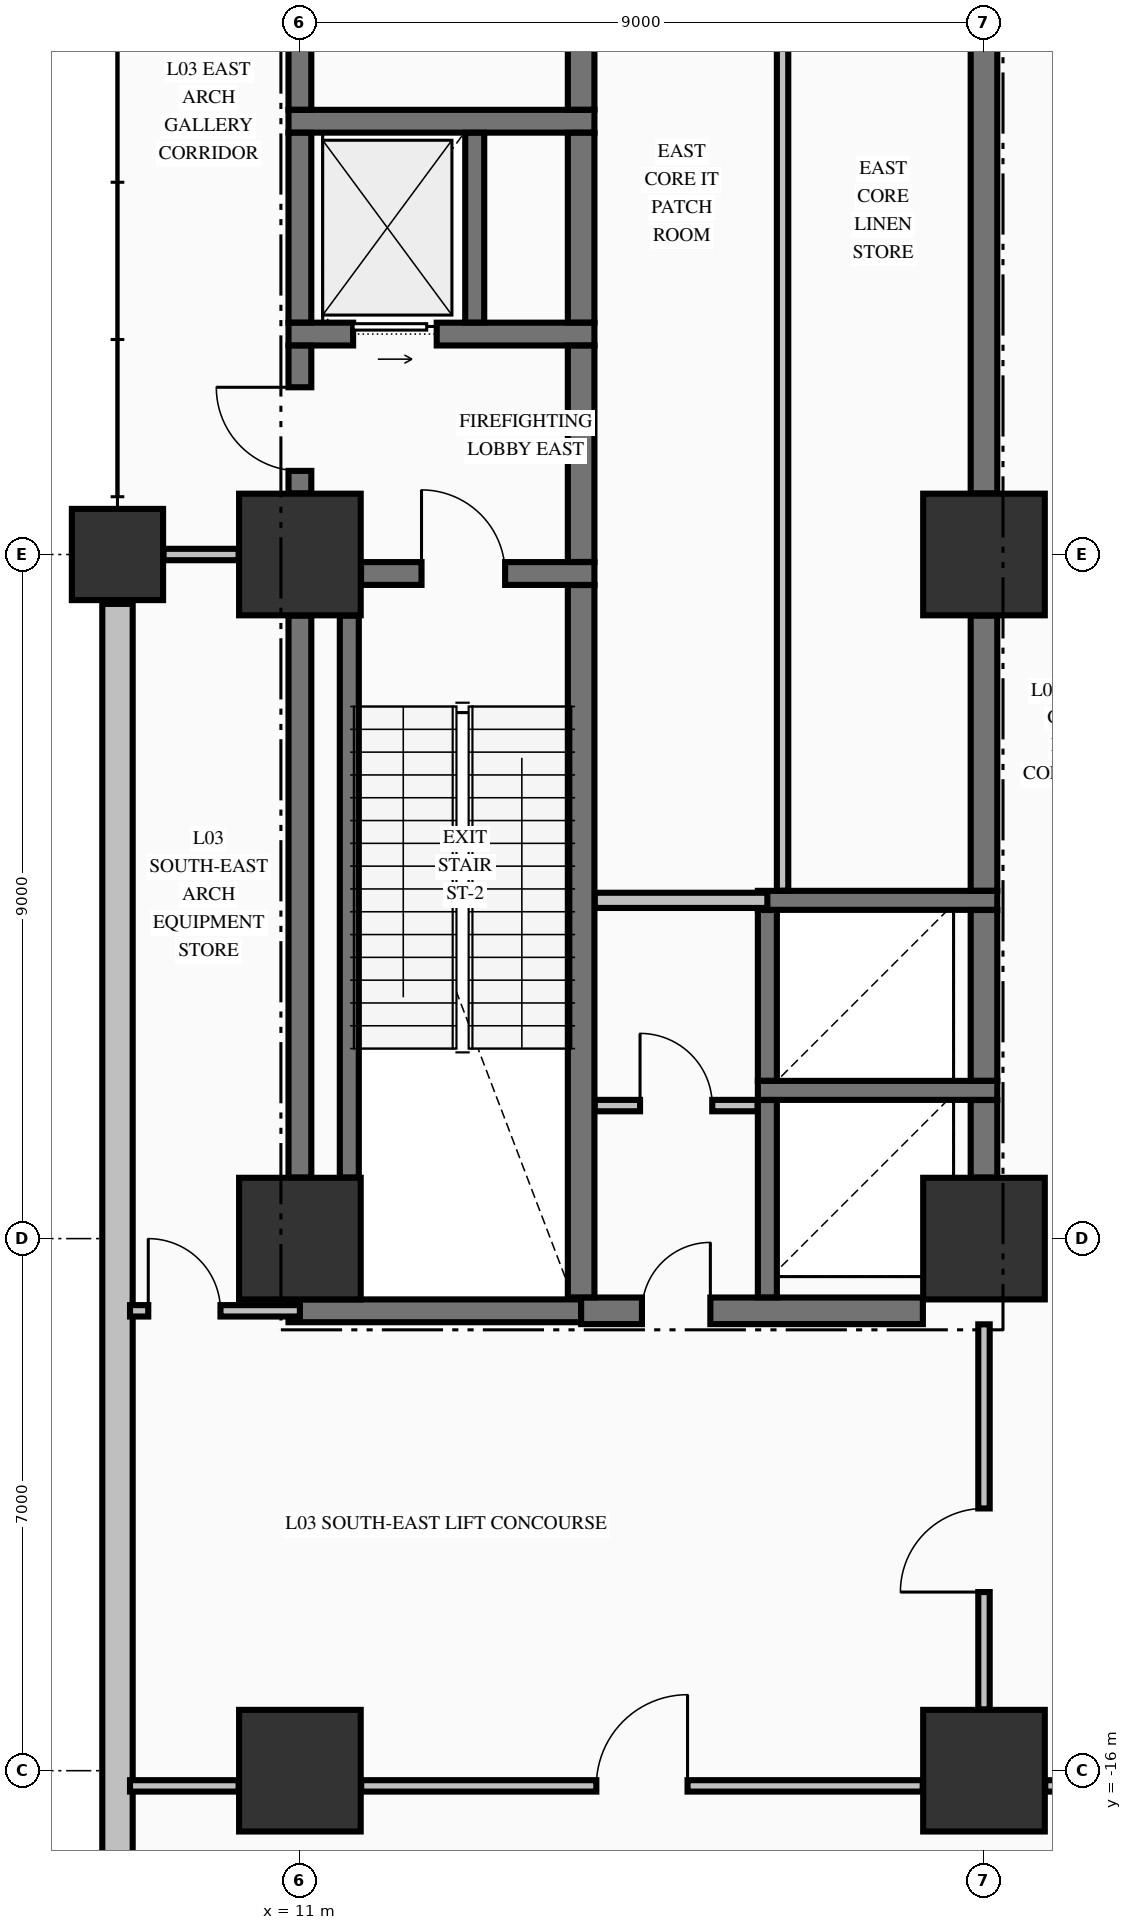
"""IFC4 building model, lengths in metres.
Left out: names, types, materials, properties, quantities, classifications, styles, units other than length and angle.
Written with IfcOpenShell. Run it as: python <this file> out.ifc"""

import sys

from ifc_helpers import new_model, si_unit, direction, frame, frame_2d, origin, origin_2d, place, context, subcontext, project, spatial, rectangle, extrude, element, fill, save


model = new_model("IFC4")
c1 = context("Model", 3, precision=1e-05, world=origin(), true_north=direction((0.0, 1.0)))
c2 = subcontext(c1, "Body", "Model", "MODEL_VIEW")
j1 = project(units=[si_unit("LENGTHUNIT", "METRE"), si_unit("PLANEANGLEUNIT", "RADIAN")], contexts=[c1])
p1 = place(None, origin())
s1 = spatial("IfcSite", under=j1, at=p1, CompositionType="ELEMENT")
p2 = place(p1, origin())
s2 = spatial("IfcBuilding", under=s1, at=p2, CompositionType="ELEMENT")
p3 = place(p2, frame((0.0, 0.0, 16.32)))
s3 = spatial("IfcBuildingStorey", under=s2, at=p3, CompositionType="ELEMENT", Elevation=16.32)
for number, where, z_axis, x_axis in (
    (1, (11.0, -16.0, 0.0), (0.0, 0.0, 1.0), (1.0, 0.0, 0.0)),
    (2, (11.0, -9.0, 0.0), (0.0, 0.0, 1.0), (1.0, 0.0, 0.0)),
    (3, (11.0, 0.0, 0.0), (0.0, 0.0, 1.0), (1.0, 0.0, 0.0)),
    (4, (20.0, -16.0, 0.0), (0.0, 0.0, 1.0), (1.0, 0.0, 0.0)),
    (5, (20.0, -9.0, 0.0), (0.0, 0.0, 1.0), (1.0, 0.0, 0.0)),
    (6, (20.0, 0.0, 0.0), (0.0, 0.0, 1.0), (1.0, 0.0, 0.0)),
):
    element("IfcColumn", number, at=place(p3, frame(where, z_axis=z_axis, x_axis=x_axis)), inside=s3, PredefinedType="COLUMN", context=c2, shape_type="SweptSolid", body=[
        extrude(rectangle(XDim=1.6, YDim=1.6, at=origin_2d()), origin(), (0.0, 0.0, 1.0), 4.99),
    ])
p4 = place(p3, frame((8.6, 0.0, 0.0), z_axis=(0.0, 0.0, 1.0), x_axis=(1.0, 0.0, 0.0)))
e7 = element("IfcColumn", 7, at=p4, inside=s3, PredefinedType="COLUMN", context=c2, shape_type="SweptSolid", body=[
    extrude(rectangle(XDim=1.2, YDim=1.2, at=origin_2d()), origin(), (0.0, 0.0, 1.0), 4.99),
])
p5 = place(p3, frame((8.6, -0.65, 0.0), z_axis=(0.0, 0.0, 1.0), x_axis=(0.0, -1.0, 0.0)))
e8 = element("IfcWall", 8, at=p5, inside=s3, PredefinedType="STANDARD", context=c2, shape_type="SweptSolid", body=[
    extrude(rectangle(XDim=24.72, YDim=0.4, at=frame_2d((12.36, 0.0))), origin(), (0.0, 0.0, 1.0), 2.582),
])
p6 = place(p3, frame((10.85, -9.95, 0.0), z_axis=(0.0, 0.0, 1.0), x_axis=(1.0, 0.0, 0.0)))
e9 = element("IfcWall", 9, at=p6, inside=s3, PredefinedType="SHEAR", context=c2, shape_type="SweptSolid", body=[
    extrude(rectangle(XDim=3.85, YDim=0.3, at=frame_2d((1.925, 0.0))), origin(), (0.0, 0.0, 1.0), 4.99),
])
p7 = place(p3, frame((14.7, -9.95, 0.0), z_axis=(0.0, 0.0, 1.0), x_axis=(1.0, 0.0, 0.0)))
e10 = element("IfcWall", 10, at=p7, inside=s3, PredefinedType="SHEAR", context=c2, shape_type="SweptSolid", body=[
    extrude(rectangle(XDim=4.496, YDim=0.35, at=frame_2d((2.248, 0.0))), origin(), (0.0, 0.0, 1.0), 4.99),
])
p8 = place(p7, frame((0.8, 0.0, 0.0)))
e11 = element("IfcOpeningElement", 11, at=p8, cuts=e10, PredefinedType="OPENING", context=c2, shape_type="SweptSolid", body=[
    extrude(rectangle(XDim=0.9, YDim=2.15, at=frame_2d((0.45, 1.075))), frame((0.0, 0.185, 0.0), z_axis=(0.0, -1.0, 0.0), x_axis=(1.0, 0.0, 0.0)), (0.0, 0.0, 1.0), 0.37),
])
for number, where, z_axis, x_axis in (
    (12, (17.025, -7.05, 0.0), (0.0, 0.0, 1.0), (1.0, 0.0, 0.0)),
    (13, (17.025, -4.55, 0.0), (0.0, 0.0, 1.0), (1.0, 0.0, 0.0)),
):
    element("IfcWall", number, at=place(p3, frame(where, z_axis=z_axis, x_axis=x_axis)), inside=s3, PredefinedType="SOLIDWALL", context=c2, shape_type="SweptSolid", body=[
        extrude(rectangle(XDim=3.15, YDim=0.25, at=frame_2d((1.575, 0.0))), origin(), (0.0, 0.0, 1.0), 4.99),
    ])
p9 = place(p3, frame((11.804, -0.25, 0.0), z_axis=(0.0, 0.0, 1.0), x_axis=(1.0, 0.0, 0.0)))
e14 = element("IfcWall", 14, at=p9, inside=s3, PredefinedType="SHEAR", context=c2, shape_type="SweptSolid", body=[
    extrude(rectangle(XDim=3.071, YDim=0.3, at=frame_2d((1.536, 0.0))), origin(), (0.0, 0.0, 1.0), 4.99),
])
p10 = place(p9, frame((0.796, 0.0, 0.0)))
e15 = element("IfcOpeningElement", 15, at=p10, cuts=e14, PredefinedType="OPENING", context=c2, shape_type="SweptSolid", body=[
    extrude(rectangle(XDim=1.1, YDim=2.15, at=frame_2d((0.55, 1.075))), frame((0.0, 0.16, 0.0), z_axis=(0.0, -1.0, 0.0), x_axis=(1.0, 0.0, 0.0)), (0.0, 0.0, 1.0), 0.32),
])
p11 = place(p3, frame((10.85, 2.9, 0.0), z_axis=(0.0, 0.0, 1.0), x_axis=(1.0, 0.0, 0.0)))
e16 = element("IfcWall", 16, at=p11, inside=s3, PredefinedType="SHEAR", context=c2, shape_type="SweptSolid", body=[
    extrude(rectangle(XDim=4.025, YDim=0.3, at=frame_2d((2.012, 0.0))), origin(), (0.0, 0.0, 1.0), 4.99),
])
p12 = place(p11, frame((0.85, 0.0, 0.0)))
e17 = element("IfcOpeningElement", 17, at=p12, cuts=e16, PredefinedType="OPENING", context=c2, shape_type="SweptSolid", body=[
    extrude(rectangle(XDim=1.1, YDim=2.2, at=frame_2d((0.55, 1.1))), frame((0.0, 0.16, 0.0), z_axis=(0.0, -1.0, 0.0), x_axis=(1.0, 0.0, 0.0)), (0.0, 0.0, 1.0), 0.32),
])
p13 = place(p3, frame((10.85, 5.7, 0.0), z_axis=(0.0, 0.0, 1.0), x_axis=(1.0, 0.0, 0.0)))
e18 = element("IfcWall", 18, at=p13, inside=s3, PredefinedType="SHEAR", context=c2, shape_type="SweptSolid", body=[
    extrude(rectangle(XDim=4.025, YDim=0.3, at=frame_2d((2.012, 0.0))), origin(), (0.0, 0.0, 1.0), 4.99),
])
p14 = place(p3, frame((8.765, -16.2, 0.0), z_axis=(0.0, 0.0, 1.0), x_axis=(1.0, 0.0, 0.0)))
e19 = element("IfcWall", 19, at=p14, inside=s3, PredefinedType="PARTITIONING", context=c2, shape_type="SweptSolid", body=[
    extrude(rectangle(XDim=1.429, YDim=0.15, at=frame_2d((0.715, 0.0))), origin(), (0.0, 0.0, 1.0), 4.99),
])
p15 = place(p3, frame((11.806, -16.2, 0.0), z_axis=(0.0, 0.0, 1.0), x_axis=(1.0, 0.0, 0.0)))
e20 = element("IfcWall", 20, at=p15, inside=s3, PredefinedType="PARTITIONING", context=c2, shape_type="SweptSolid", body=[
    extrude(rectangle(XDim=7.388, YDim=0.15, at=frame_2d((3.694, 0.0))), origin(), (0.0, 0.0, 1.0), 3.332),
])
p16 = place(p15, frame((3.094, 0.0, 0.0)))
e21 = element("IfcOpeningElement", 21, at=p16, cuts=e20, PredefinedType="OPENING", context=c2, shape_type="SweptSolid", body=[
    extrude(rectangle(XDim=1.2, YDim=2.15, at=frame_2d((0.6, 1.075))), frame((0.0, 0.085, 0.0), z_axis=(0.0, -1.0, 0.0), x_axis=(1.0, 0.0, 0.0)), (0.0, 0.0, 1.0), 0.17),
])
p17 = place(p3, frame((20.806, -16.2, 0.0), z_axis=(0.0, 0.0, 1.0), x_axis=(1.0, 0.0, 0.0)))
e22 = element("IfcWall", 22, at=p17, inside=s3, PredefinedType="PARTITIONING", context=c2, shape_type="SweptSolid", body=[
    extrude(rectangle(XDim=4.488, YDim=0.15, at=frame_2d((2.244, 0.0))), origin(), (0.0, 0.0, 1.0), 3.332),
])
p18 = place(p17, frame((0.15, 0.0, 0.0)))
e23 = element("IfcOpeningElement", 23, at=p18, cuts=e22, PredefinedType="OPENING", context=c2, shape_type="SweptSolid", body=[
    extrude(rectangle(XDim=1.1, YDim=2.15, at=frame_2d((0.55, 1.075))), frame((0.0, 0.085, 0.0), z_axis=(0.0, -1.0, 0.0), x_axis=(1.0, 0.0, 0.0)), (0.0, 0.0, 1.0), 0.17),
])
p19 = place(p17, frame((2.844, 0.0, 0.0)))
e24 = element("IfcOpeningElement", 24, at=p19, cuts=e22, PredefinedType="OPENING", context=c2, shape_type="SweptSolid", body=[
    extrude(rectangle(XDim=1.1, YDim=2.15, at=frame_2d((0.55, 1.075))), frame((0.0, 0.085, 0.0), z_axis=(0.0, -1.0, 0.0), x_axis=(1.0, 0.0, 0.0)), (0.0, 0.0, 1.0), 0.17),
])
p20 = place(p3, frame((8.765, -9.95, 0.0), z_axis=(0.0, 0.0, 1.0), x_axis=(1.0, 0.0, 0.0)))
e25 = element("IfcWall", 25, at=p20, inside=s3, PredefinedType="PARTITIONING", context=c2, shape_type="SweptSolid", body=[
    extrude(rectangle(XDim=2.235, YDim=0.15, at=frame_2d((1.118, 0.0))), origin(), (0.0, 0.0, 1.0), 4.99),
])
p21 = place(p20, frame((0.24, 0.0, 0.0)))
e26 = element("IfcOpeningElement", 26, at=p21, cuts=e25, PredefinedType="OPENING", context=c2, shape_type="SweptSolid", body=[
    extrude(rectangle(XDim=0.95, YDim=2.15, at=frame_2d((0.475, 1.075))), frame((0.0, 0.085, 0.0), z_axis=(0.0, -1.0, 0.0), x_axis=(1.0, 0.0, 0.0)), (0.0, 0.0, 1.0), 0.17),
])
p22 = place(p3, frame((14.878, -7.25, 0.0), z_axis=(0.0, 0.0, 1.0), x_axis=(1.0, 0.0, 0.0)))
e27 = element("IfcWall", 27, at=p22, inside=s3, PredefinedType="PARTITIONING", context=c2, shape_type="SweptSolid", body=[
    extrude(rectangle(XDim=2.144, YDim=0.15, at=frame_2d((1.072, 0.0))), origin(), (0.0, 0.0, 1.0), 4.99),
])
p23 = place(p22, frame((0.597, 0.0, 0.0)))
e28 = element("IfcOpeningElement", 28, at=p23, cuts=e27, PredefinedType="OPENING", context=c2, shape_type="SweptSolid", body=[
    extrude(rectangle(XDim=0.95, YDim=2.15, at=frame_2d((0.475, 1.075))), frame((0.0, 0.085, 0.0), z_axis=(0.0, -1.0, 0.0), x_axis=(1.0, 0.0, 0.0)), (0.0, 0.0, 1.0), 0.17),
])
p24 = place(p3, frame((14.878, -4.55, 0.0), z_axis=(0.0, 0.0, 1.0), x_axis=(1.0, 0.0, 0.0)))
e29 = element("IfcWall", 29, at=p24, inside=s3, PredefinedType="PARTITIONING", context=c2, shape_type="SweptSolid", body=[
    extrude(rectangle(XDim=2.272, YDim=0.2, at=frame_2d((1.136, 0.0))), origin(), (0.0, 0.0, 1.0), 4.99),
])
p25 = place(p3, frame((9.206, 0.0, 0.0), z_axis=(0.0, 0.0, 1.0), x_axis=(1.0, 0.0, 0.0)))
e30 = element("IfcWall", 30, at=p25, inside=s3, PredefinedType="PARTITIONING", context=c2, shape_type="SweptSolid", body=[
    extrude(rectangle(XDim=0.988, YDim=0.15, at=frame_2d((0.494, 0.0))), origin(), (0.0, 0.0, 1.0), 3.332),
])
p26 = place(p3, frame((11.0, -8.196, 0.0), z_axis=(0.0, 0.0, 1.0), x_axis=(0.0, 1.0, 0.0)))
e31 = element("IfcWall", 31, at=p26, inside=s3, PredefinedType="SHEAR", context=c2, shape_type="SweptSolid", body=[
    extrude(rectangle(XDim=7.392, YDim=0.3, at=frame_2d((3.696, 0.0))), origin(), (0.0, 0.0, 1.0), 4.99),
])
p27 = place(p3, frame((11.0, 0.804, 0.0), z_axis=(0.0, 0.0, 1.0), x_axis=(0.0, 1.0, 0.0)))
e32 = element("IfcWall", 32, at=p27, inside=s3, PredefinedType="SHEAR", context=c2, shape_type="SweptSolid", body=[
    extrude(rectangle(XDim=1.944, YDim=0.3, at=frame_2d((0.972, 0.0))), origin(), (0.0, 0.0, 1.0), 4.99),
])
p28 = place(p27, frame((0.296, 0.0, 0.0)))
e33 = element("IfcOpeningElement", 33, at=p28, cuts=e32, PredefinedType="OPENING", context=c2, shape_type="SweptSolid", body=[
    extrude(rectangle(XDim=1.1, YDim=2.15, at=frame_2d((0.55, 1.075))), frame((0.0, 0.16, 0.0), z_axis=(0.0, -1.0, 0.0), x_axis=(1.0, 0.0, 0.0)), (0.0, 0.0, 1.0), 0.32),
])
p29 = place(p3, frame((11.0, 3.052, 0.0), z_axis=(0.0, 0.0, 1.0), x_axis=(0.0, 1.0, 0.0)))
e34 = element("IfcWall", 34, at=p29, inside=s3, PredefinedType="SHEAR", context=c2, shape_type="SweptSolid", body=[
    extrude(rectangle(XDim=2.496, YDim=0.3, at=frame_2d((1.248, 0.0))), origin(), (0.0, 0.0, 1.0), 4.99),
])
p30 = place(p3, frame((11.0, 5.852, 0.0), z_axis=(0.0, 0.0, 1.0), x_axis=(0.0, 1.0, 0.0)))
e35 = element("IfcWall", 35, at=p30, inside=s3, PredefinedType="SHEAR", context=c2, shape_type="SweptSolid", body=[
    extrude(rectangle(XDim=2.344, YDim=0.3, at=frame_2d((1.172, 0.0))), origin(), (0.0, 0.0, 1.0), 4.99),
])
p31 = place(p3, frame((11.65, -8.196, 0.0), z_axis=(0.0, 0.0, 1.0), x_axis=(0.0, 1.0, 0.0)))
e36 = element("IfcWall", 36, at=p31, inside=s3, PredefinedType="SOLIDWALL", context=c2, shape_type="SweptSolid", body=[
    extrude(rectangle(XDim=7.392, YDim=0.25, at=frame_2d((3.696, 0.0))), origin(), (0.0, 0.0, 1.0), 4.99),
])
p32 = place(p3, frame((13.3, 3.052, 0.0), z_axis=(0.0, 0.0, 1.0), x_axis=(0.0, 1.0, 0.0)))
e37 = element("IfcWall", 37, at=p32, inside=s3, PredefinedType="SOLIDWALL", context=c2, shape_type="SweptSolid", body=[
    extrude(rectangle(XDim=2.496, YDim=0.25, at=frame_2d((1.248, 0.0))), origin(), (0.0, 0.0, 1.0), 4.99),
])
p33 = place(p3, frame((14.7, -9.773, 0.0), z_axis=(0.0, 0.0, 1.0), x_axis=(0.0, 1.0, 0.0)))
e38 = element("IfcWall", 38, at=p33, inside=s3, PredefinedType="SHEAR", context=c2, shape_type="SweptSolid", body=[
    extrude(rectangle(XDim=9.371, YDim=0.35, at=frame_2d((4.686, 0.0))), origin(), (0.0, 0.0, 1.0), 4.99),
])
p34 = place(p3, frame((14.7, -0.098, 0.0), z_axis=(0.0, 0.0, 1.0), x_axis=(0.0, 1.0, 0.0)))
e39 = element("IfcWall", 39, at=p34, inside=s3, PredefinedType="SHEAR", context=c2, shape_type="SweptSolid", body=[
    extrude(rectangle(XDim=2.846, YDim=0.35, at=frame_2d((1.423, 0.0))), origin(), (0.0, 0.0, 1.0), 4.99),
])
p35 = place(p3, frame((14.7, 3.052, 0.0), z_axis=(0.0, 0.0, 1.0), x_axis=(0.0, 1.0, 0.0)))
e40 = element("IfcWall", 40, at=p35, inside=s3, PredefinedType="SHEAR", context=c2, shape_type="SweptSolid", body=[
    extrude(rectangle(XDim=2.496, YDim=0.35, at=frame_2d((1.248, 0.0))), origin(), (0.0, 0.0, 1.0), 4.99),
])
p36 = place(p3, frame((14.7, 5.852, 0.0), z_axis=(0.0, 0.0, 1.0), x_axis=(0.0, 1.0, 0.0)))
e41 = element("IfcWall", 41, at=p36, inside=s3, PredefinedType="SHEAR", context=c2, shape_type="SweptSolid", body=[
    extrude(rectangle(XDim=4.471, YDim=0.35, at=frame_2d((2.235, 0.0))), origin(), (0.0, 0.0, 1.0), 4.99),
])
p37 = place(p3, frame((17.15, -9.773, 0.0), z_axis=(0.0, 0.0, 1.0), x_axis=(0.0, 1.0, 0.0)))
e42 = element("IfcWall", 42, at=p37, inside=s3, PredefinedType="SOLIDWALL", context=c2, shape_type="SweptSolid", body=[
    extrude(rectangle(XDim=2.596, YDim=0.25, at=frame_2d((1.298, 0.0))), origin(), (0.0, 0.0, 1.0), 4.99),
])
p38 = place(p3, frame((17.15, -6.923, 0.0), z_axis=(0.0, 0.0, 1.0), x_axis=(0.0, 1.0, 0.0)))
e43 = element("IfcWall", 43, at=p38, inside=s3, PredefinedType="SOLIDWALL", context=c2, shape_type="SweptSolid", body=[
    extrude(rectangle(XDim=2.246, YDim=0.25, at=frame_2d((1.123, 0.0))), origin(), (0.0, 0.0, 1.0), 4.99),
])
p39 = place(p3, frame((20.0, -8.196, 0.0), z_axis=(0.0, 0.0, 1.0), x_axis=(0.0, 1.0, 0.0)))
e44 = element("IfcWall", 44, at=p39, inside=s3, PredefinedType="SHEAR", context=c2, shape_type="SweptSolid", body=[
    extrude(rectangle(XDim=1.019, YDim=0.35, at=frame_2d((0.51, 0.0))), origin(), (0.0, 0.0, 1.0), 4.99),
])
p40 = place(p3, frame((20.0, -6.923, 0.0), z_axis=(0.0, 0.0, 1.0), x_axis=(0.0, 1.0, 0.0)))
e45 = element("IfcWall", 45, at=p40, inside=s3, PredefinedType="SHEAR", context=c2, shape_type="SweptSolid", body=[
    extrude(rectangle(XDim=2.246, YDim=0.35, at=frame_2d((1.123, 0.0))), origin(), (0.0, 0.0, 1.0), 4.99),
])
p41 = place(p3, frame((20.0, -4.423, 0.0), z_axis=(0.0, 0.0, 1.0), x_axis=(0.0, 1.0, 0.0)))
e46 = element("IfcWall", 46, at=p41, inside=s3, PredefinedType="SHEAR", context=c2, shape_type="SweptSolid", body=[
    extrude(rectangle(XDim=3.619, YDim=0.35, at=frame_2d((1.81, 0.0))), origin(), (0.0, 0.0, 1.0), 4.99),
])
p42 = place(p3, frame((20.0, 0.804, 0.0), z_axis=(0.0, 0.0, 1.0), x_axis=(0.0, 1.0, 0.0)))
e47 = element("IfcWall", 47, at=p42, inside=s3, PredefinedType="SHEAR", context=c2, shape_type="SweptSolid", body=[
    extrude(rectangle(XDim=7.392, YDim=0.35, at=frame_2d((3.696, 0.0))), origin(), (0.0, 0.0, 1.0), 4.99),
])
p43 = place(p3, frame((17.35, -4.422, 0.0), z_axis=(0.0, 0.0, 1.0), x_axis=(0.0, 1.0, 0.0)))
e48 = element("IfcWall", 48, at=p43, inside=s3, PredefinedType="PARTITIONING", context=c2, shape_type="SweptSolid", body=[
    extrude(rectangle(XDim=14.744, YDim=0.15, at=frame_2d((7.372, 0.0))), origin(), (0.0, 0.0, 1.0), 4.99),
])
p44 = place(p3, frame((20.0, -15.194, 0.0), z_axis=(0.0, 0.0, 1.0), x_axis=(0.0, 1.0, 0.0)))
e49 = element("IfcWall", 49, at=p44, inside=s3, PredefinedType="PARTITIONING", context=c2, shape_type="SweptSolid", body=[
    extrude(rectangle(XDim=5.066, YDim=0.15, at=frame_2d((2.533, 0.0))), origin(), (0.0, 0.0, 1.0), 4.032),
])
p45 = place(p44, frame((1.544, 0.0, 0.0)))
e50 = element("IfcOpeningElement", 50, at=p45, cuts=e49, PredefinedType="OPENING", context=c2, shape_type="SweptSolid", body=[
    extrude(rectangle(XDim=1.1, YDim=2.15, at=frame_2d((0.55, 1.075))), frame((0.0, 0.085, 0.0), z_axis=(0.0, -1.0, 0.0), x_axis=(1.0, 0.0, 0.0)), (0.0, 0.0, 1.0), 0.17),
])
p46 = place(p10, origin())
e51 = element("IfcDoor", 51, at=p46, inside=s3, OperationType="SINGLE_SWING_LEFT", PredefinedType="DOOR", context=c2, shape_type="SweptSolid", body=[
    extrude(rectangle(XDim=1.1, YDim=2.15, at=frame_2d((0.55, 1.075))), frame((0.0, 0.025, 0.0), z_axis=(0.0, -1.0, 0.0), x_axis=(1.0, 0.0, 0.0)), (0.0, 0.0, 1.0), 0.05),
])
fill(e15, e51)
p47 = place(p28, origin())
e52 = element("IfcDoor", 52, at=p47, inside=s3, OperationType="SINGLE_SWING_RIGHT", PredefinedType="DOOR", context=c2, shape_type="SweptSolid", body=[
    extrude(rectangle(XDim=1.1, YDim=2.15, at=frame_2d((0.55, 1.075))), frame((0.0, 0.025, 0.0), z_axis=(0.0, -1.0, 0.0), x_axis=(1.0, 0.0, 0.0)), (0.0, 0.0, 1.0), 0.05),
])
fill(e33, e52)
p48 = place(p12, origin())
e53 = element("IfcDoor", 53, at=p48, inside=s3, OperationType="SLIDING_TO_RIGHT", PredefinedType="DOOR", context=c2, shape_type="SweptSolid", body=[
    extrude(rectangle(XDim=1.1, YDim=2.2, at=frame_2d((0.55, 1.1))), frame((0.0, 0.025, 0.0), z_axis=(0.0, -1.0, 0.0), x_axis=(1.0, 0.0, 0.0)), (0.0, 0.0, 1.0), 0.05),
])
fill(e17, e53)
p49 = place(p8, origin())
e54 = element("IfcDoor", 54, at=p49, inside=s3, OperationType="SINGLE_SWING_RIGHT", PredefinedType="DOOR", context=c2, shape_type="SweptSolid", body=[
    extrude(rectangle(XDim=0.9, YDim=2.15, at=frame_2d((0.45, 1.075))), frame((0.0, 0.025, 0.0), z_axis=(0.0, -1.0, 0.0), x_axis=(1.0, 0.0, 0.0)), (0.0, 0.0, 1.0), 0.05),
])
fill(e11, e54)
p50 = place(p23, origin())
e55 = element("IfcDoor", 55, at=p50, inside=s3, OperationType="SINGLE_SWING_LEFT", PredefinedType="DOOR", context=c2, shape_type="SweptSolid", body=[
    extrude(rectangle(XDim=0.95, YDim=2.15, at=frame_2d((0.475, 1.075))), frame((0.0, 0.025, 0.0), z_axis=(0.0, -1.0, 0.0), x_axis=(1.0, 0.0, 0.0)), (0.0, 0.0, 1.0), 0.05),
])
fill(e28, e55)
p51 = place(p21, origin())
e56 = element("IfcDoor", 56, at=p51, inside=s3, OperationType="SINGLE_SWING_LEFT", PredefinedType="DOOR", context=c2, shape_type="SweptSolid", body=[
    extrude(rectangle(XDim=0.95, YDim=2.15, at=frame_2d((0.475, 1.075))), frame((0.0, 0.025, 0.0), z_axis=(0.0, -1.0, 0.0), x_axis=(1.0, 0.0, 0.0)), (0.0, 0.0, 1.0), 0.05),
])
fill(e26, e56)
p52 = place(p45, origin())
e57 = element("IfcDoor", 57, at=p52, inside=s3, OperationType="SINGLE_SWING_LEFT", PredefinedType="DOOR", context=c2, shape_type="SweptSolid", body=[
    extrude(rectangle(XDim=1.1, YDim=2.15, at=frame_2d((0.55, 1.075))), frame((0.0, 0.025, 0.0), z_axis=(0.0, -1.0, 0.0), x_axis=(1.0, 0.0, 0.0)), (0.0, 0.0, 1.0), 0.05),
])
fill(e50, e57)
p53 = place(p16, origin())
e58 = element("IfcDoor", 58, at=p53, inside=s3, OperationType="SINGLE_SWING_RIGHT", PredefinedType="DOOR", context=c2, shape_type="SweptSolid", body=[
    extrude(rectangle(XDim=1.2, YDim=2.15, at=frame_2d((0.6, 1.075))), frame((0.0, 0.025, 0.0), z_axis=(0.0, -1.0, 0.0), x_axis=(1.0, 0.0, 0.0)), (0.0, 0.0, 1.0), 0.05),
])
fill(e21, e58)
save(model, sys.argv[1])
